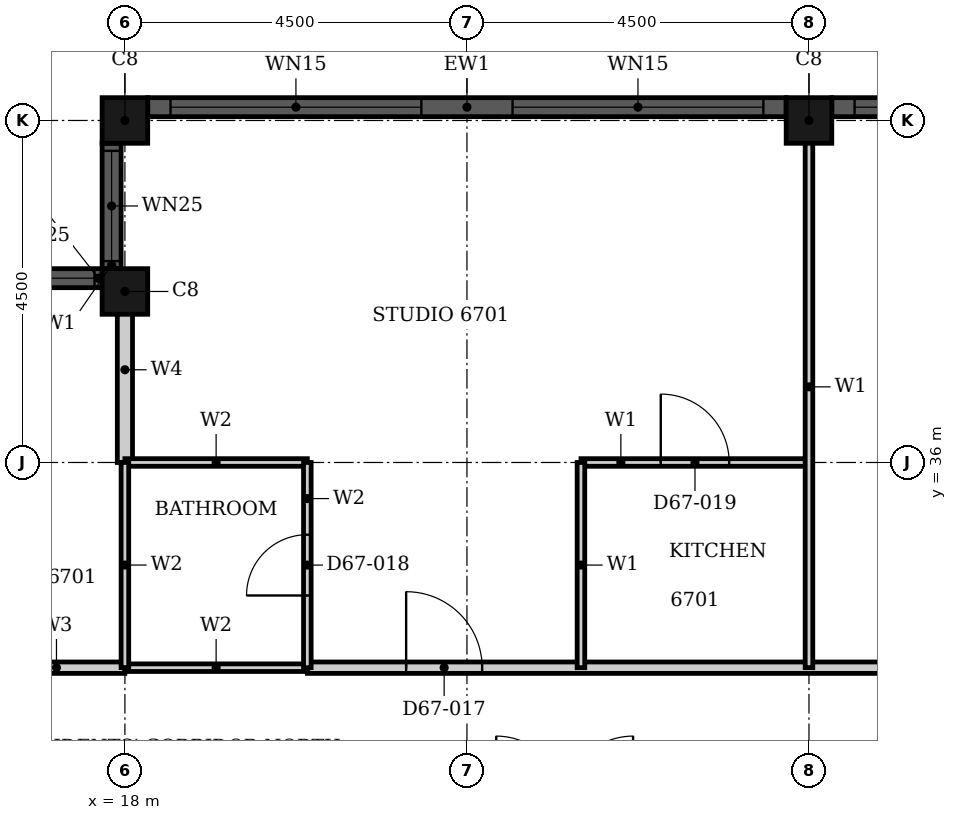
"""IFC4 building model, lengths in metres.
Left out: names, types, materials, properties, quantities, classifications, styles, units other than length and angle.
Written with IfcOpenShell. Run it as: python <this file> out.ifc"""

import sys

from ifc_helpers import new_model, si_unit, direction, frame, frame_2d, origin, origin_2d, place, context, subcontext, project, spatial, rectangle, hollow_rectangle, extrude, element, fill, save


model = new_model("IFC4")
c1 = context("Model", 3, precision=1e-05, world=origin(), true_north=direction((0.0, 1.0)))
c2 = subcontext(c1, "Body", "Model", "MODEL_VIEW")
j1 = project(units=[si_unit("LENGTHUNIT", "METRE"), si_unit("PLANEANGLEUNIT", "RADIAN")], contexts=[c1])
p1 = place(None, origin())
s1 = spatial("IfcSite", under=j1, at=p1, CompositionType="ELEMENT")
p2 = place(p1, origin())
s2 = spatial("IfcBuilding", under=s1, at=p2, CompositionType="ELEMENT")
p3 = place(p2, frame((0.0, 0.0, 263.8)))
s3 = spatial("IfcBuildingStorey", under=s2, at=p3, CompositionType="ELEMENT", Elevation=263.8)
for number, where, z_axis, x_axis in (
    (1, (27.0, 40.5, 0.0), (0.0, 0.0, 1.0), (1.0, 0.0, 0.0)),
    (2, (18.0, 40.5, 0.0), (0.0, 0.0, 1.0), (1.0, 0.0, 0.0)),
    (3, (18.0, 38.25, 0.0), (0.0, 0.0, 1.0), (1.0, 0.0, 0.0)),
):
    element("IfcColumn", number, at=place(p3, frame(where, z_axis=z_axis, x_axis=x_axis)), inside=s3, PredefinedType="COLUMN", context=c2, shape_type="SweptSolid", body=[
        extrude(hollow_rectangle(XDim=0.6, YDim=0.6, WallThickness=0.02, at=origin_2d()), origin(), (0.0, 0.0, 1.0), 3.7),
    ])
p4 = place(p3, frame((35.7, 40.675, 0.0), z_axis=(0.0, 0.0, 1.0), x_axis=(-1.0, 0.0, 0.0)))
e4 = element("IfcWall", 4, at=p4, inside=s3, PredefinedType="SOLIDWALL", context=c2, shape_type="SweptSolid", body=[
    extrude(rectangle(XDim=8.4, YDim=0.25, at=frame_2d((4.2, 0.0))), origin(), (0.0, 0.0, 1.0), 3.7),
])
p5 = place(p4, frame((0.3, 0.0, 0.45)))
e5 = element("IfcOpeningElement", 5, at=p5, cuts=e4, PredefinedType="OPENING", context=c2, shape_type="SweptSolid", body=[
    extrude(rectangle(XDim=3.3, YDim=2.3, at=frame_2d((1.65, 1.15))), frame((0.0, 0.135, 0.0), z_axis=(0.0, -1.0, 0.0), x_axis=(1.0, 0.0, 0.0)), (0.0, 0.0, 1.0), 0.27),
])
p6 = place(p4, frame((4.8, 0.0, 0.45)))
e6 = element("IfcOpeningElement", 6, at=p6, cuts=e4, PredefinedType="OPENING", context=c2, shape_type="SweptSolid", body=[
    extrude(rectangle(XDim=3.3, YDim=2.3, at=frame_2d((1.65, 1.15))), frame((0.0, 0.135, 0.0), z_axis=(0.0, -1.0, 0.0), x_axis=(1.0, 0.0, 0.0)), (0.0, 0.0, 1.0), 0.27),
])
p7 = place(p3, frame((26.7, 40.675, 0.0), z_axis=(0.0, 0.0, 1.0), x_axis=(-1.0, 0.0, 0.0)))
e7 = element("IfcWall", 7, at=p7, inside=s3, PredefinedType="SOLIDWALL", context=c2, shape_type="SweptSolid", body=[
    extrude(rectangle(XDim=8.4, YDim=0.25, at=frame_2d((4.2, 0.0))), origin(), (0.0, 0.0, 1.0), 3.7),
])
p8 = place(p7, frame((0.3, 0.0, 0.45)))
e8 = element("IfcOpeningElement", 8, at=p8, cuts=e7, PredefinedType="OPENING", context=c2, shape_type="SweptSolid", body=[
    extrude(rectangle(XDim=3.3, YDim=2.3, at=frame_2d((1.65, 1.15))), frame((0.0, 0.135, 0.0), z_axis=(0.0, -1.0, 0.0), x_axis=(1.0, 0.0, 0.0)), (0.0, 0.0, 1.0), 0.27),
])
p9 = place(p7, frame((4.8, 0.0, 0.45)))
e9 = element("IfcOpeningElement", 9, at=p9, cuts=e7, PredefinedType="OPENING", context=c2, shape_type="SweptSolid", body=[
    extrude(rectangle(XDim=3.3, YDim=2.3, at=frame_2d((1.65, 1.15))), frame((0.0, 0.135, 0.0), z_axis=(0.0, -1.0, 0.0), x_axis=(1.0, 0.0, 0.0)), (0.0, 0.0, 1.0), 0.27),
])
p10 = place(p3, frame((17.825, 40.2, 0.0), z_axis=(0.0, 0.0, 1.0), x_axis=(0.0, -1.0, 0.0)))
e10 = element("IfcWall", 10, at=p10, inside=s3, PredefinedType="SOLIDWALL", context=c2, shape_type="SweptSolid", body=[
    extrude(rectangle(XDim=1.65, YDim=0.25, at=frame_2d((0.825, 0.0))), origin(), (0.0, 0.0, 1.0), 3.7),
])
p11 = place(p10, frame((0.1, 0.0, 0.9)))
e11 = element("IfcOpeningElement", 11, at=p11, cuts=e10, PredefinedType="OPENING", context=c2, shape_type="SweptSolid", body=[
    extrude(rectangle(XDim=1.45, YDim=1.85, at=frame_2d((0.725, 0.925))), frame((0.0, 0.135, 0.0), z_axis=(0.0, -1.0, 0.0), x_axis=(1.0, 0.0, 0.0)), (0.0, 0.0, 1.0), 0.27),
])
p12 = place(p3, frame((17.7, 38.425, 0.0), z_axis=(0.0, 0.0, 1.0), x_axis=(-1.0, 0.0, 0.0)))
e12 = element("IfcWall", 12, at=p12, inside=s3, PredefinedType="SOLIDWALL", context=c2, shape_type="SweptSolid", body=[
    extrude(rectangle(XDim=1.65, YDim=0.25, at=frame_2d((0.825, 0.0))), origin(), (0.0, 0.0, 1.0), 3.7),
])
p13 = place(p12, frame((0.1, 0.0, 0.9)))
e13 = element("IfcOpeningElement", 13, at=p13, cuts=e12, PredefinedType="OPENING", context=c2, shape_type="SweptSolid", body=[
    extrude(rectangle(XDim=1.45, YDim=1.85, at=frame_2d((0.725, 0.925))), frame((0.0, 0.135, 0.0), z_axis=(0.0, -1.0, 0.0), x_axis=(1.0, 0.0, 0.0)), (0.0, 0.0, 1.0), 0.27),
])
p14 = place(p3, frame((20.4, 33.3, 0.0), z_axis=(0.0, 0.0, 1.0), x_axis=(1.0, 0.0, 0.0)))
e14 = element("IfcWall", 14, at=p14, inside=s3, PredefinedType="PARTITIONING", context=c2, shape_type="SweptSolid", body=[
    extrude(rectangle(XDim=22.2, YDim=0.15, at=frame_2d((11.1, 0.0))), origin(), (0.0, 0.0, 1.0), 3.4),
])
p15 = place(p14, frame((1.3, 0.0, 0.0)))
e15 = element("IfcOpeningElement", 15, at=p15, cuts=e14, PredefinedType="OPENING", context=c2, shape_type="SweptSolid", body=[
    extrude(rectangle(XDim=1.0, YDim=2.2, at=frame_2d((0.5, 1.1))), frame((0.0, 0.085, 0.0), z_axis=(0.0, -1.0, 0.0), x_axis=(1.0, 0.0, 0.0)), (0.0, 0.0, 1.0), 0.17),
])
p16 = place(p14, frame((10.6, 0.0, 0.0)))
e16 = element("IfcOpeningElement", 16, at=p16, cuts=e14, PredefinedType="OPENING", context=c2, shape_type="SweptSolid", body=[
    extrude(rectangle(XDim=1.0, YDim=2.1, at=frame_2d((0.5, 1.05))), frame((0.0, 0.085, 0.0), z_axis=(0.0, -1.0, 0.0), x_axis=(1.0, 0.0, 0.0)), (0.0, 0.0, 1.0), 0.17),
])
p17 = place(p14, frame((19.9, 0.0, 0.0)))
e17 = element("IfcOpeningElement", 17, at=p17, cuts=e14, PredefinedType="OPENING", context=c2, shape_type="SweptSolid", body=[
    extrude(rectangle(XDim=1.0, YDim=2.2, at=frame_2d((0.5, 1.1))), frame((0.0, 0.085, 0.0), z_axis=(0.0, -1.0, 0.0), x_axis=(1.0, 0.0, 0.0)), (0.0, 0.0, 1.0), 0.17),
])
p18 = place(p3, frame((16.2, 33.3, 0.0), z_axis=(0.0, 0.0, 1.0), x_axis=(1.0, 0.0, 0.0)))
e18 = element("IfcWall", 18, at=p18, inside=s3, PredefinedType="PARTITIONING", context=c2, shape_type="SweptSolid", body=[
    extrude(rectangle(XDim=1.799, YDim=0.15, at=frame_2d((0.899, 0.0))), origin(), (0.0, 0.0, 1.0), 3.4),
])
p19 = place(p3, frame((24.0, 36.0, 0.0), z_axis=(0.0, 0.0, 1.0), x_axis=(1.0, 0.0, 0.0)))
e19 = element("IfcWall", 19, at=p19, inside=s3, PredefinedType="PARTITIONING", context=c2, shape_type="SweptSolid", body=[
    extrude(rectangle(XDim=3.0, YDim=0.1, at=frame_2d((1.5, 0.0))), origin(), (0.0, 0.0, 1.0), 3.4),
])
p20 = place(p19, frame((1.05, 0.0, 0.0)))
e20 = element("IfcOpeningElement", 20, at=p20, cuts=e19, PredefinedType="OPENING", context=c2, shape_type="SweptSolid", body=[
    extrude(rectangle(XDim=0.9, YDim=2.1, at=frame_2d((0.45, 1.05))), frame((0.0, 0.06, 0.0), z_axis=(0.0, -1.0, 0.0), x_axis=(1.0, 0.0, 0.0)), (0.0, 0.0, 1.0), 0.12),
])
p21 = place(p3, frame((24.0, 33.3, 0.0), z_axis=(0.0, 0.0, 1.0), x_axis=(0.0, 1.0, 0.0)))
e21 = element("IfcWall", 21, at=p21, inside=s3, PredefinedType="PARTITIONING", context=c2, shape_type="SweptSolid", body=[
    extrude(rectangle(XDim=2.7, YDim=0.1, at=frame_2d((1.35, 0.0))), origin(), (0.0, 0.0, 1.0), 3.4),
])
p22 = place(p3, frame((27.0, 33.3, 0.0), z_axis=(0.0, 0.0, 1.0), x_axis=(0.0, 1.0, 0.0)))
e22 = element("IfcWall", 22, at=p22, inside=s3, PredefinedType="PARTITIONING", context=c2, shape_type="SweptSolid", body=[
    extrude(rectangle(XDim=7.39, YDim=0.1, at=frame_2d((3.695, 0.0))), origin(), (0.0, 0.0, 1.0), 3.4),
])
p23 = place(p3, frame((18.0, 36.0, 0.0), z_axis=(0.0, 0.0, 1.0), x_axis=(0.0, 1.0, 0.0)))
e23 = element("IfcWall", 23, at=p23, inside=s3, PredefinedType="PARTITIONING", context=c2, shape_type="SweptSolid", body=[
    extrude(rectangle(XDim=2.44, YDim=0.2, at=frame_2d((1.22, 0.0))), origin(), (0.0, 0.0, 1.0), 3.4),
])
for number, where, z_axis, x_axis in (
    (24, (18.0, 33.3, 0.0), (0.0, 0.0, 1.0), (1.0, 0.0, 0.0)),
    (25, (18.0, 36.0, 0.0), (0.0, 0.0, 1.0), (1.0, 0.0, 0.0)),
):
    element("IfcWall", number, at=place(p3, frame(where, z_axis=z_axis, x_axis=x_axis)), inside=s3, PredefinedType="PARTITIONING", context=c2, shape_type="SweptSolid", body=[
        extrude(rectangle(XDim=2.4, YDim=0.1, at=frame_2d((1.2, 0.0))), origin(), (0.0, 0.0, 1.0), 3.4),
    ])
p24 = place(p3, frame((18.0, 33.301, 0.0), z_axis=(0.0, 0.0, 1.0), x_axis=(0.0, 1.0, 0.0)))
e26 = element("IfcWall", 26, at=p24, inside=s3, PredefinedType="PARTITIONING", context=c2, shape_type="SweptSolid", body=[
    extrude(rectangle(XDim=2.699, YDim=0.1, at=frame_2d((1.35, 0.0))), origin(), (0.0, 0.0, 1.0), 3.4),
])
p25 = place(p3, frame((20.4, 33.3, 0.0), z_axis=(0.0, 0.0, 1.0), x_axis=(0.0, 1.0, 0.0)))
e27 = element("IfcWall", 27, at=p25, inside=s3, PredefinedType="PARTITIONING", context=c2, shape_type="SweptSolid", body=[
    extrude(rectangle(XDim=2.7, YDim=0.1, at=frame_2d((1.35, 0.0))), origin(), (0.0, 0.0, 1.0), 3.4),
])
p26 = place(p25, frame((0.95, 0.0, 0.0)))
e28 = element("IfcOpeningElement", 28, at=p26, cuts=e27, PredefinedType="OPENING", context=c2, shape_type="SweptSolid", body=[
    extrude(rectangle(XDim=0.8, YDim=2.1, at=frame_2d((0.4, 1.05))), frame((0.0, 0.06, 0.0), z_axis=(0.0, -1.0, 0.0), x_axis=(1.0, 0.0, 0.0)), (0.0, 0.0, 1.0), 0.12),
])
p27 = place(p6, origin())
e29 = element("IfcWindow", 29, at=p27, inside=s3, PartitioningType="SINGLE_PANEL", PredefinedType="WINDOW", context=c2, shape_type="SweptSolid", body=[
    extrude(rectangle(XDim=3.3, YDim=2.3, at=frame_2d((1.65, 1.15))), frame((0.0, 0.03, 0.0), z_axis=(0.0, -1.0, 0.0), x_axis=(1.0, 0.0, 0.0)), (0.0, 0.0, 1.0), 0.06),
])
fill(e6, e29)
p28 = place(p8, origin())
e30 = element("IfcWindow", 30, at=p28, inside=s3, PartitioningType="SINGLE_PANEL", PredefinedType="WINDOW", context=c2, shape_type="SweptSolid", body=[
    extrude(rectangle(XDim=3.3, YDim=2.3, at=frame_2d((1.65, 1.15))), frame((0.0, 0.03, 0.0), z_axis=(0.0, -1.0, 0.0), x_axis=(1.0, 0.0, 0.0)), (0.0, 0.0, 1.0), 0.06),
])
fill(e8, e30)
p29 = place(p9, origin())
e31 = element("IfcWindow", 31, at=p29, inside=s3, PartitioningType="SINGLE_PANEL", PredefinedType="WINDOW", context=c2, shape_type="SweptSolid", body=[
    extrude(rectangle(XDim=3.3, YDim=2.3, at=frame_2d((1.65, 1.15))), frame((0.0, 0.03, 0.0), z_axis=(0.0, -1.0, 0.0), x_axis=(1.0, 0.0, 0.0)), (0.0, 0.0, 1.0), 0.06),
])
fill(e9, e31)
p30 = place(p11, origin())
e32 = element("IfcWindow", 32, at=p30, inside=s3, PartitioningType="SINGLE_PANEL", PredefinedType="WINDOW", context=c2, shape_type="SweptSolid", body=[
    extrude(rectangle(XDim=1.45, YDim=1.85, at=frame_2d((0.725, 0.925))), frame((0.0, 0.03, 0.0), z_axis=(0.0, -1.0, 0.0), x_axis=(1.0, 0.0, 0.0)), (0.0, 0.0, 1.0), 0.06),
])
fill(e11, e32)
p31 = place(p13, origin())
e33 = element("IfcWindow", 33, at=p31, inside=s3, PartitioningType="SINGLE_PANEL", PredefinedType="WINDOW", context=c2, shape_type="SweptSolid", body=[
    extrude(rectangle(XDim=1.45, YDim=1.85, at=frame_2d((0.725, 0.925))), frame((0.0, 0.03, 0.0), z_axis=(0.0, -1.0, 0.0), x_axis=(1.0, 0.0, 0.0)), (0.0, 0.0, 1.0), 0.06),
])
fill(e13, e33)
p32 = place(p15, origin())
e34 = element("IfcDoor", 34, at=p32, inside=s3, OperationType="SINGLE_SWING_LEFT", PredefinedType="DOOR", context=c2, shape_type="SweptSolid", body=[
    extrude(rectangle(XDim=1.0, YDim=2.2, at=frame_2d((0.5, 1.1))), frame((0.0, 0.025, 0.0), z_axis=(0.0, -1.0, 0.0), x_axis=(1.0, 0.0, 0.0)), (0.0, 0.0, 1.0), 0.05),
])
fill(e15, e34)
p33 = place(p26, origin())
e35 = element("IfcDoor", 35, at=p33, inside=s3, OperationType="SINGLE_SWING_RIGHT", PredefinedType="DOOR", context=c2, shape_type="SweptSolid", body=[
    extrude(rectangle(XDim=0.8, YDim=2.1, at=frame_2d((0.4, 1.05))), frame((0.0, 0.025, 0.0), z_axis=(0.0, -1.0, 0.0), x_axis=(1.0, 0.0, 0.0)), (0.0, 0.0, 1.0), 0.05),
])
fill(e28, e35)
p34 = place(p20, origin())
e36 = element("IfcDoor", 36, at=p34, inside=s3, OperationType="SINGLE_SWING_RIGHT", PredefinedType="DOOR", context=c2, shape_type="SweptSolid", body=[
    extrude(rectangle(XDim=0.9, YDim=2.1, at=frame_2d((0.45, 1.05))), frame((0.0, 0.025, 0.0), z_axis=(0.0, -1.0, 0.0), x_axis=(1.0, 0.0, 0.0)), (0.0, 0.0, 1.0), 0.05),
])
fill(e20, e36)
save(model, sys.argv[1])
